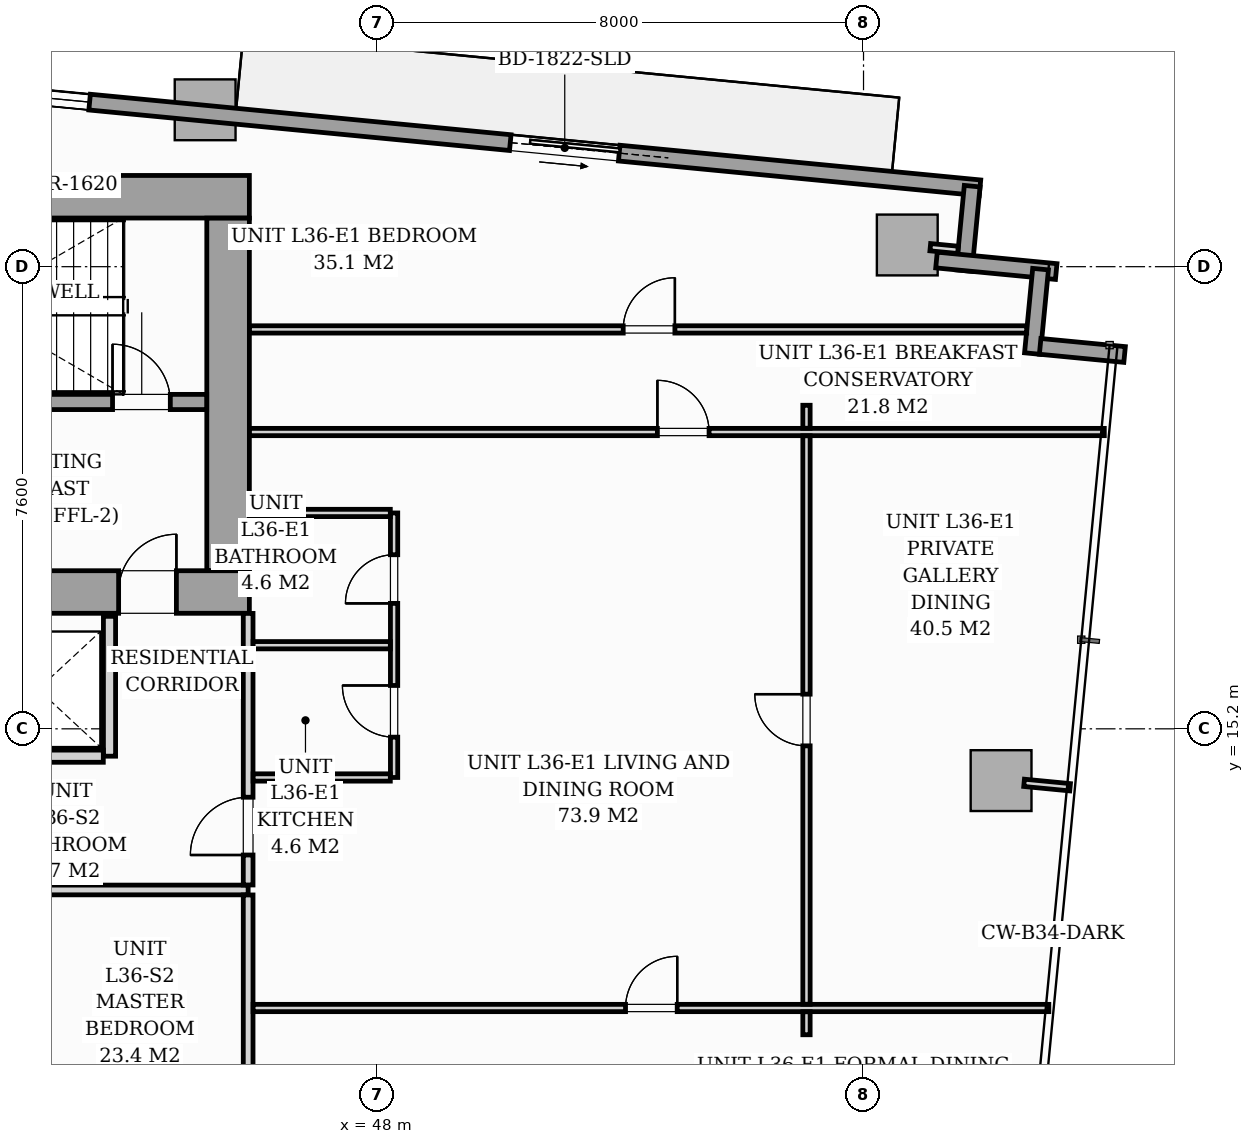
"""IFC4 building model, lengths in metres.
Left out: names, types, materials, properties, quantities, classifications, styles, units other than length and angle.
Written with IfcOpenShell. Run it as: python <this file> out.ifc"""

import sys

from ifc_helpers import new_model, si_unit, direction, frame, frame_2d, origin, origin_2d, place, context, subcontext, project, spatial, rectangle, i_section, extrude, source, transform, mapped, element, fill, save


model = new_model("IFC4")
c1 = context("Model", 3, precision=1e-05, world=origin(), true_north=direction((0.0, 1.0)))
c2 = subcontext(c1, "Body", "Model", "MODEL_VIEW")
j1 = project(units=[si_unit("LENGTHUNIT", "METRE"), si_unit("PLANEANGLEUNIT", "RADIAN")], contexts=[c1])
p1 = place(None, origin())
s1 = spatial("IfcSite", under=j1, at=p1, CompositionType="ELEMENT")
p2 = place(p1, origin())
s2 = spatial("IfcBuilding", under=s1, at=p2, CompositionType="ELEMENT")
p3 = place(p2, frame((0.0, 0.0, 127.8)))
s3 = spatial("IfcBuildingStorey", under=s2, at=p3, CompositionType="ELEMENT", Elevation=127.8)
m1 = source(origin(), c2, "Body", "SweptSolid", [
    extrude(i_section(OverallWidth=0.421, OverallDepth=0.465, WebThickness=0.045, FlangeThickness=0.073, FilletRadius=0.018, at=origin_2d()), origin(), (0.0, 0.0, 1.0), 3.196),
])
for number, where, z_axis, x_axis in (
    (1, (45.6, 17.4, 0.002), (0.0, 0.0, 1.0), (1.0, 0.0, 0.0)),
    (2, (45.6, 24.0, 0.002), (0.0, 0.0, 1.0), (1.0, 0.0, 0.0)),
):
    element("IfcColumn", number, at=place(p3, frame(where, z_axis=z_axis, x_axis=x_axis)), inside=s3, PredefinedType="PILASTER", context=c2, shape_type="MappedRepresentation", body=[
        mapped(m1, transform((0.0, 0.0, 0.0), scale=1.0)),
    ])
m2 = source(origin(), c2, "Body", "SweptSolid", [
    extrude(rectangle(XDim=1.0, YDim=1.0, at=origin_2d()), origin(), (0.0, 0.0, 1.0), 3.196),
])
for number, where, z_axis, x_axis in (
    (3, (45.173, 25.38, 0.002), (0.0, 0.0, 1.0), (0.995, -0.096, 0.0)),
    (4, (56.719, 23.157, 0.002), (0.0, 0.0, 1.0), (0.995, -0.096, 0.0)),
    (5, (58.262, 14.348, 0.002), (0.0, 0.0, 1.0), (0.995, -0.096, 0.0)),
):
    element("IfcColumn", number, at=place(p3, frame(where, z_axis=z_axis, x_axis=x_axis)), inside=s3, PredefinedType="COLUMN", context=c2, shape_type="MappedRepresentation", body=[
        mapped(m2, transform((0.0, 0.0, 0.0), scale=1.0)),
    ])
p4 = place(p3, frame((40.983, 25.727, 0.0), z_axis=(0.0, 0.0, 1.0), x_axis=(0.995395844771, -0.095849424686, 0.0)))
e6 = element("IfcWall", 6, at=p4, inside=s3, PredefinedType="STANDARD", context=c2, shape_type="SweptSolid", body=[
    extrude(rectangle(XDim=17.01, YDim=0.26, at=frame_2d((8.505, 0.0))), origin(), (0.0, 0.0, 1.0), 2.94),
])
p5 = place(p4, frame((9.25, 0.0, 0.0)))
e7 = element("IfcOpeningElement", 7, at=p5, cuts=e6, PredefinedType="OPENING", context=c2, shape_type="SweptSolid", body=[
    extrude(rectangle(XDim=1.8, YDim=2.06, at=frame_2d((0.9, 1.03))), frame((0.0, 0.14, 0.0), z_axis=(0.0, -1.0, 0.0), x_axis=(1.0, 0.0, 0.0)), (0.0, 0.0, 1.0), 0.28),
])
p6 = place(p4, frame((0.7, 0.0, 0.65)))
e8 = element("IfcOpeningElement", 8, at=p6, cuts=e6, PredefinedType="OPENING", context=c2, shape_type="SweptSolid", body=[
    extrude(rectangle(XDim=1.6, YDim=1.5, at=frame_2d((0.8, 0.75))), frame((0.0, 0.14, 0.0), z_axis=(0.0, -1.0, 0.0), x_axis=(1.0, 0.0, 0.0)), (0.0, 0.0, 1.0), 0.28),
])
p7 = place(p3, frame((57.787, 24.124, 0.0), z_axis=(0.0, 0.0, 1.0), x_axis=(-0.095915846097, -0.995389446633, 0.0)))
e9 = element("IfcWall", 9, at=p7, inside=s3, PredefinedType="STANDARD", context=c2, shape_type="SweptSolid", body=[
    extrude(rectangle(XDim=1.395, YDim=0.26, at=frame_2d((0.697, 0.0))), origin(), (0.0, 0.0, 1.0), 2.94),
])
p8 = place(p3, frame((57.2, 22.909, 0.0), z_axis=(0.0, 0.0, 1.0), x_axis=(0.995401789159, -0.095787672171, 0.0)))
e10 = element("IfcWall", 10, at=p8, inside=s3, PredefinedType="STANDARD", context=c2, shape_type="SweptSolid", body=[
    extrude(rectangle(XDim=1.978, YDim=0.26, at=frame_2d((0.989, 0.0))), origin(), (0.0, 0.0, 1.0), 2.94),
])
for number, where, z_axis, x_axis in (
    (11, (58.912, 22.76, 0.0), (0.0, 0.0, 1.0), (-0.096, -0.995, 0.0)),
    (12, (58.905, 21.49, 0.0), (0.0, 0.0, 1.0), (0.995, -0.096, 0.0)),
):
    element("IfcWall", number, at=place(p3, frame(where, z_axis=z_axis, x_axis=x_axis)), inside=s3, PredefinedType="STANDARD", context=c2, shape_type="SweptSolid", body=[
        extrude(rectangle(XDim=1.395, YDim=0.26, at=frame_2d((0.698, 0.0))), origin(), (0.0, 0.0, 1.0), 2.94),
    ])
p9 = place(p3, frame((26.1, 17.45, 0.0), z_axis=(0.0, 0.0, 1.0), x_axis=(1.0, 0.0, 0.0)))
e13 = element("IfcWall", 13, at=p9, inside=s3, PredefinedType="SHEAR", context=c2, shape_type="SweptSolid", body=[
    extrude(rectangle(XDim=19.8, YDim=0.7, at=frame_2d((9.9, 0.0))), origin(), (0.0, 0.0, 1.0), 3.2),
])
p10 = place(p9, frame((1.05, 0.0, 0.0)))
e14 = element("IfcOpeningElement", 14, at=p10, cuts=e13, PredefinedType="OPENING", context=c2, shape_type="SweptSolid", body=[
    extrude(rectangle(XDim=0.95, YDim=2.06, at=frame_2d((0.475, 1.03))), frame((0.0, 0.36, 0.0), z_axis=(0.0, -1.0, 0.0), x_axis=(1.0, 0.0, 0.0)), (0.0, 0.0, 1.0), 0.72),
])
p11 = place(p9, frame((9.48, 0.0, 0.0)))
e15 = element("IfcOpeningElement", 15, at=p11, cuts=e13, PredefinedType="OPENING", context=c2, shape_type="SweptSolid", body=[
    extrude(rectangle(XDim=0.85, YDim=2.0, at=frame_2d((0.425, 1.0))), frame((0.0, 0.36, 0.0), z_axis=(0.0, -1.0, 0.0), x_axis=(1.0, 0.0, 0.0)), (0.0, 0.0, 1.0), 0.72),
])
p12 = place(p9, frame((17.65, 0.0, 0.0)))
e16 = element("IfcOpeningElement", 16, at=p12, cuts=e13, PredefinedType="OPENING", context=c2, shape_type="SweptSolid", body=[
    extrude(rectangle(XDim=0.95, YDim=2.06, at=frame_2d((0.475, 1.03))), frame((0.0, 0.36, 0.0), z_axis=(0.0, -1.0, 0.0), x_axis=(1.0, 0.0, 0.0)), (0.0, 0.0, 1.0), 0.72),
])
p13 = place(p3, frame((26.1, 23.95, 0.0), z_axis=(0.0, 0.0, 1.0), x_axis=(1.0, 0.0, 0.0)))
e17 = element("IfcWall", 17, at=p13, inside=s3, PredefinedType="SHEAR", context=c2, shape_type="SweptSolid", body=[
    extrude(rectangle(XDim=19.8, YDim=0.7, at=frame_2d((9.9, 0.0))), origin(), (0.0, 0.0, 1.0), 3.2),
])
p14 = place(p3, frame((45.55, 17.802, 0.0), z_axis=(0.0, 0.0, 1.0), x_axis=(0.0, 1.0, 0.0)))
e18 = element("IfcWall", 18, at=p14, inside=s3, PredefinedType="SHEAR", context=c2, shape_type="SweptSolid", body=[
    extrude(rectangle(XDim=5.796, YDim=0.7, at=frame_2d((2.898, 0.0))), origin(), (0.0, 0.0, 1.0), 3.2),
])
p15 = place(p3, frame((37.05, 20.575, 0.0), z_axis=(0.0, 0.0, 1.0), x_axis=(1.0, 0.0, 0.0)))
e19 = element("IfcWall", 19, at=p15, inside=s3, PredefinedType="SOLIDWALL", context=c2, shape_type="SweptSolid", body=[
    extrude(rectangle(XDim=8.148, YDim=0.25, at=frame_2d((4.074, 0.0))), origin(), (0.0, 0.0, 1.0), 3.2),
])
p16 = place(p15, frame((6.6, 0.0, 0.0)))
e20 = element("IfcOpeningElement", 20, at=p16, cuts=e19, PredefinedType="OPENING", context=c2, shape_type="SweptSolid", body=[
    extrude(rectangle(XDim=0.95, YDim=2.06, at=frame_2d((0.475, 1.03))), frame((0.0, 0.135, 0.0), z_axis=(0.0, -1.0, 0.0), x_axis=(1.0, 0.0, 0.0)), (0.0, 0.0, 1.0), 0.27),
])
p17 = place(p3, frame((43.6, 14.75, 0.0), z_axis=(0.0, 0.0, 1.0), x_axis=(0.0, 1.0, 0.0)))
e21 = element("IfcWall", 21, at=p17, inside=s3, PredefinedType="PARTITIONING", context=c2, shape_type="SweptSolid", body=[
    extrude(rectangle(XDim=2.3, YDim=0.2, at=frame_2d((1.15, 0.0))), origin(), (0.0, 0.0, 1.0), 2.94),
])
p18 = place(p3, frame((41.352, 14.75, 0.0), z_axis=(0.0, 0.0, 1.0), x_axis=(1.0, 0.0, 0.0)))
e22 = element("IfcWall", 22, at=p18, inside=s3, PredefinedType="PARTITIONING", context=c2, shape_type="SweptSolid", body=[
    extrude(rectangle(XDim=2.146, YDim=0.2, at=frame_2d((1.073, 0.0))), origin(), (0.0, 0.0, 1.0), 2.94),
])
p19 = place(p3, frame((22.05, 12.55, 0.0), z_axis=(0.0, 0.0, 1.0), x_axis=(1.0, 0.0, 0.0)))
e23 = element("IfcWall", 23, at=p19, inside=s3, PredefinedType="PARTITIONING", context=c2, shape_type="SweptSolid", body=[
    extrude(rectangle(XDim=23.83, YDim=0.16, at=frame_2d((11.915, 0.0))), origin(), (0.0, 0.0, 1.0), 2.94),
])
p20 = place(p19, frame((0.655, 0.0, 0.0)))
e24 = element("IfcOpeningElement", 24, at=p20, cuts=e23, PredefinedType="OPENING", context=c2, shape_type="SweptSolid", body=[
    extrude(rectangle(XDim=0.95, YDim=2.06, at=frame_2d((0.475, 1.03))), frame((0.0, 0.09, 0.0), z_axis=(0.0, -1.0, 0.0), x_axis=(1.0, 0.0, 0.0)), (0.0, 0.0, 1.0), 0.18),
])
p21 = place(p19, frame((12.04, 0.0, 0.0)))
e25 = element("IfcOpeningElement", 25, at=p21, cuts=e23, PredefinedType="OPENING", context=c2, shape_type="SweptSolid", body=[
    extrude(rectangle(XDim=0.95, YDim=2.06, at=frame_2d((0.475, 1.03))), frame((0.0, 0.09, 0.0), z_axis=(0.0, -1.0, 0.0), x_axis=(1.0, 0.0, 0.0)), (0.0, 0.0, 1.0), 0.18),
])
p22 = place(p3, frame((45.88, 5.958, 0.0), z_axis=(0.0, 0.0, 1.0), x_axis=(0.0, 1.0, 0.0)))
e26 = element("IfcWall", 26, at=p22, inside=s3, PredefinedType="PARTITIONING", context=c2, shape_type="SweptSolid", body=[
    extrude(rectangle(XDim=6.51, YDim=0.16, at=frame_2d((3.255, 0.0))), origin(), (0.0, 0.0, 1.0), 2.94),
])
p23 = place(p3, frame((45.88, 12.632, 0.0), z_axis=(0.0, 0.0, 1.0), x_axis=(0.0, 1.0, 0.0)))
e27 = element("IfcWall", 27, at=p23, inside=s3, PredefinedType="PARTITIONING", context=c2, shape_type="SweptSolid", body=[
    extrude(rectangle(XDim=4.466, YDim=0.16, at=frame_2d((2.233, 0.0))), origin(), (0.0, 0.0, 1.0), 2.94),
])
p24 = place(p23, frame((0.493, 0.0, 0.0)))
e28 = element("IfcOpeningElement", 28, at=p24, cuts=e27, PredefinedType="OPENING", context=c2, shape_type="SweptSolid", body=[
    extrude(rectangle(XDim=0.95, YDim=2.06, at=frame_2d((0.475, 1.03))), frame((0.0, 0.09, 0.0), z_axis=(0.0, -1.0, 0.0), x_axis=(1.0, 0.0, 0.0)), (0.0, 0.0, 1.0), 0.18),
])
p25 = place(p3, frame((48.28, 14.4, 0.0), z_axis=(0.0, 0.0, 1.0), x_axis=(0.0, 1.0, 0.0)))
e29 = element("IfcWall", 29, at=p25, inside=s3, PredefinedType="PARTITIONING", context=c2, shape_type="SweptSolid", body=[
    extrude(rectangle(XDim=4.35, YDim=0.12, at=frame_2d((2.175, 0.0))), origin(), (0.0, 0.0, 1.0), 2.94),
])
p26 = place(p25, frame((0.663, 0.0, 0.0)))
e30 = element("IfcOpeningElement", 30, at=p26, cuts=e29, PredefinedType="OPENING", context=c2, shape_type="SweptSolid", body=[
    extrude(rectangle(XDim=0.85, YDim=2.05, at=frame_2d((0.425, 1.025))), frame((0.0, 0.07, 0.0), z_axis=(0.0, -1.0, 0.0), x_axis=(1.0, 0.0, 0.0)), (0.0, 0.0, 1.0), 0.14),
])
p27 = place(p25, frame((2.863, 0.0, 0.0)))
e31 = element("IfcOpeningElement", 31, at=p27, cuts=e29, PredefinedType="OPENING", context=c2, shape_type="SweptSolid", body=[
    extrude(rectangle(XDim=0.8, YDim=2.02, at=frame_2d((0.4, 1.01))), frame((0.0, 0.07, 0.0), z_axis=(0.0, -1.0, 0.0), x_axis=(1.0, 0.0, 0.0)), (0.0, 0.0, 1.0), 0.14),
])
for number, where, z_axis, x_axis in (
    (32, (45.962, 16.575, 0.0), (0.0, 0.0, 1.0), (1.0, 0.0, 0.0)),
    (33, (45.962, 14.4, 0.0), (0.0, 0.0, 1.0), (1.0, 0.0, 0.0)),
):
    element("IfcWall", number, at=place(p3, frame(where, z_axis=z_axis, x_axis=x_axis)), inside=s3, PredefinedType="PARTITIONING", context=c2, shape_type="SweptSolid", body=[
        extrude(rectangle(XDim=2.256, YDim=0.12, at=frame_2d((1.128, 0.0))), origin(), (0.0, 0.0, 1.0), 2.94),
    ])
p28 = place(p3, frame((45.902, 18.75, 0.0), z_axis=(0.0, 0.0, 1.0), x_axis=(1.0, 0.0, 0.0)))
e34 = element("IfcWall", 34, at=p28, inside=s3, PredefinedType="PARTITIONING", context=c2, shape_type="SweptSolid", body=[
    extrude(rectangle(XDim=2.316, YDim=0.12, at=frame_2d((1.158, 0.0))), origin(), (0.0, 0.0, 1.0), 2.94),
])
p29 = place(p3, frame((45.902, 21.768, 0.0), z_axis=(0.0, 0.0, 1.0), x_axis=(1.0, 0.0, 0.0)))
e35 = element("IfcWall", 35, at=p29, inside=s3, PredefinedType="PARTITIONING", context=c2, shape_type="SweptSolid", body=[
    extrude(rectangle(XDim=12.781, YDim=0.12, at=frame_2d((6.391, 0.0))), origin(), (0.0, 0.0, 1.0), 2.94),
])
p30 = place(p29, frame((6.146, 0.0, 0.0)))
e36 = element("IfcOpeningElement", 36, at=p30, cuts=e35, PredefinedType="OPENING", context=c2, shape_type="SweptSolid", body=[
    extrude(rectangle(XDim=0.85, YDim=2.05, at=frame_2d((0.425, 1.025))), frame((0.0, 0.07, 0.0), z_axis=(0.0, -1.0, 0.0), x_axis=(1.0, 0.0, 0.0)), (0.0, 0.0, 1.0), 0.14),
])
p31 = place(p3, frame((45.962, 10.609, 0.0), z_axis=(0.0, 0.0, 1.0), x_axis=(1.0, 0.0, 0.0)))
e37 = element("IfcWall", 37, at=p31, inside=s3, PredefinedType="PARTITIONING", context=c2, shape_type="SweptSolid", body=[
    extrude(rectangle(XDim=13.085, YDim=0.12, at=frame_2d((6.543, 0.0))), origin(), (0.0, 0.0, 1.0), 2.94),
])
p32 = place(p31, frame((6.124, 0.0, 0.0)))
e38 = element("IfcOpeningElement", 38, at=p32, cuts=e37, PredefinedType="OPENING", context=c2, shape_type="SweptSolid", body=[
    extrude(rectangle(XDim=0.85, YDim=2.05, at=frame_2d((0.425, 1.025))), frame((0.0, 0.07, 0.0), z_axis=(0.0, -1.0, 0.0), x_axis=(1.0, 0.0, 0.0)), (0.0, 0.0, 1.0), 0.14),
])
p33 = place(p3, frame((45.902, 20.081, 0.0), z_axis=(0.0, 0.0, 1.0), x_axis=(1.0, 0.0, 0.0)))
e39 = element("IfcWall", 39, at=p33, inside=s3, PredefinedType="PARTITIONING", context=c2, shape_type="SweptSolid", body=[
    extrude(rectangle(XDim=14.057, YDim=0.12, at=frame_2d((7.029, 0.0))), origin(), (0.0, 0.0, 1.0), 2.94),
])
p34 = place(p33, frame((6.708, 0.0, 0.0)))
e40 = element("IfcOpeningElement", 40, at=p34, cuts=e39, PredefinedType="OPENING", context=c2, shape_type="SweptSolid", body=[
    extrude(rectangle(XDim=0.85, YDim=2.05, at=frame_2d((0.425, 1.025))), frame((0.0, 0.07, 0.0), z_axis=(0.0, -1.0, 0.0), x_axis=(1.0, 0.0, 0.0)), (0.0, 0.0, 1.0), 0.14),
])
p35 = place(p3, frame((55.062, 10.169, 0.0), z_axis=(0.0, 0.0, 1.0), x_axis=(0.0, 1.0, 0.0)))
e41 = element("IfcWall", 41, at=p35, inside=s3, PredefinedType="PARTITIONING", context=c2, shape_type="SweptSolid", body=[
    extrude(rectangle(XDim=0.378, YDim=0.12, at=frame_2d((0.189, 0.0))), origin(), (0.0, 0.0, 1.0), 2.94),
])
p36 = place(p3, frame((55.062, 10.671, 0.0), z_axis=(0.0, 0.0, 1.0), x_axis=(0.0, 1.0, 0.0)))
e42 = element("IfcWall", 42, at=p36, inside=s3, PredefinedType="PARTITIONING", context=c2, shape_type="SweptSolid", body=[
    extrude(rectangle(XDim=9.348, YDim=0.12, at=frame_2d((4.674, 0.0))), origin(), (0.0, 0.0, 1.0), 2.94),
])
p37 = place(p36, frame((4.249, 0.0, 0.0)))
e43 = element("IfcOpeningElement", 43, at=p37, cuts=e42, PredefinedType="OPENING", context=c2, shape_type="SweptSolid", body=[
    extrude(rectangle(XDim=0.85, YDim=2.05, at=frame_2d((0.425, 1.025))), frame((0.0, 0.07, 0.0), z_axis=(0.0, -1.0, 0.0), x_axis=(1.0, 0.0, 0.0)), (0.0, 0.0, 1.0), 0.14),
])
p38 = place(p3, frame((55.062, 20.143, 0.0), z_axis=(0.0, 0.0, 1.0), x_axis=(0.0, 1.0, 0.0)))
e44 = element("IfcWall", 44, at=p38, inside=s3, PredefinedType="PARTITIONING", context=c2, shape_type="SweptSolid", body=[
    extrude(rectangle(XDim=0.378, YDim=0.12, at=frame_2d((0.189, 0.0))), origin(), (0.0, 0.0, 1.0), 2.94),
])
p39 = place(p3, frame((57.098, 23.12, 0.0), z_axis=(0.0, 0.0, 1.0), x_axis=(0.995384576284, -0.09596637586, 0.0)))
e45 = element("IfcWall", 45, at=p39, inside=s3, PredefinedType="PARTITIONING", context=c2, shape_type="SweptSolid", body=[
    extrude(rectangle(XDim=0.458, YDim=0.12, at=frame_2d((0.229, 0.0))), origin(), (0.0, 0.0, 1.0), 2.94),
])
p40 = place(p3, frame((58.64, 14.312, 0.0), z_axis=(0.0, 0.0, 1.0), x_axis=(0.995377786728, -0.096036772582, 0.0)))
e46 = element("IfcWall", 46, at=p40, inside=s3, PredefinedType="PARTITIONING", context=c2, shape_type="SweptSolid", body=[
    extrude(rectangle(XDim=0.76, YDim=0.12, at=frame_2d((0.38, 0.0))), origin(), (0.0, 0.0, 1.0), 2.94),
])
m3 = source(origin(), c2, "Body", "SweptSolid", [
    extrude(rectangle(XDim=1.8, YDim=2.06, at=frame_2d((0.9, 1.03))), frame((0.0, 0.025, 0.0), z_axis=(0.0, -1.0, 0.0), x_axis=(1.0, 0.0, 0.0)), (0.0, 0.0, 1.0), 0.05),
])
p41 = place(p5, origin())
e47 = element("IfcDoor", 47, at=p41, inside=s3, OperationType="SLIDING_TO_RIGHT", PredefinedType="DOOR", context=c2, shape_type="MappedRepresentation", body=[
    mapped(m3, transform((0.0, 0.0, 0.0), scale=1.0)),
])
fill(e7, e47)
m4 = source(origin(), c2, "Body", "SweptSolid", [
    extrude(rectangle(XDim=1.6, YDim=1.5, at=frame_2d((0.8, 0.75))), frame((0.0, 0.03, 0.0), z_axis=(0.0, -1.0, 0.0), x_axis=(1.0, 0.0, 0.0)), (0.0, 0.0, 1.0), 0.06),
])
p42 = place(p6, origin())
e48 = element("IfcWindow", 48, at=p42, inside=s3, PartitioningType="SINGLE_PANEL", PredefinedType="WINDOW", context=c2, shape_type="MappedRepresentation", body=[
    mapped(m4, transform((0.0, 0.0, 0.0), scale=1.0)),
])
fill(e8, e48)
m5 = source(origin(), c2, "Body", "SweptSolid", [
    extrude(rectangle(XDim=0.95, YDim=2.06, at=frame_2d((0.475, 1.03))), frame((0.0, 0.025, 0.0), z_axis=(0.0, -1.0, 0.0), x_axis=(1.0, 0.0, 0.0)), (0.0, 0.0, 1.0), 0.05),
])
p43 = place(p12, origin())
e49 = element("IfcDoor", 49, at=p43, inside=s3, OperationType="SINGLE_SWING_RIGHT", PredefinedType="DOOR", context=c2, shape_type="MappedRepresentation", body=[
    mapped(m5, transform((0.0, 0.0, 0.0), scale=1.0)),
])
fill(e16, e49)
p44 = place(p16, origin())
e50 = element("IfcDoor", 50, at=p44, inside=s3, OperationType="SINGLE_SWING_LEFT", PredefinedType="DOOR", context=c2, shape_type="MappedRepresentation", body=[
    mapped(m5, transform((0.0, 0.0, 0.0), scale=1.0)),
])
fill(e20, e50)
m6 = source(origin(), c2, "Body", "SweptSolid", [
    extrude(rectangle(XDim=0.95, YDim=2.06, at=frame_2d((0.475, 1.03))), frame((0.0, 0.025, 0.0), z_axis=(0.0, -1.0, 0.0), x_axis=(1.0, 0.0, 0.0)), (0.0, 0.0, 1.0), 0.05),
])
p45 = place(p24, origin())
e51 = element("IfcDoor", 51, at=p45, inside=s3, OperationType="SINGLE_SWING_LEFT", PredefinedType="DOOR", context=c2, shape_type="MappedRepresentation", body=[
    mapped(m6, transform((0.0, 0.0, 0.0), scale=1.0)),
])
fill(e28, e51)
m7 = source(origin(), c2, "Body", "SweptSolid", [
    extrude(rectangle(XDim=0.85, YDim=2.05, at=frame_2d((0.425, 1.025))), frame((0.0, 0.025, 0.0), z_axis=(0.0, -1.0, 0.0), x_axis=(1.0, 0.0, 0.0)), (0.0, 0.0, 1.0), 0.05),
])
p46 = place(p26, origin())
e52 = element("IfcDoor", 52, at=p46, inside=s3, OperationType="SINGLE_SWING_RIGHT", PredefinedType="DOOR", context=c2, shape_type="MappedRepresentation", body=[
    mapped(m7, transform((0.0, 0.0, 0.0), scale=1.0)),
])
fill(e30, e52)
m8 = source(origin(), c2, "Body", "SweptSolid", [
    extrude(rectangle(XDim=0.8, YDim=2.02, at=frame_2d((0.4, 1.01))), frame((0.0, 0.025, 0.0), z_axis=(0.0, -1.0, 0.0), x_axis=(1.0, 0.0, 0.0)), (0.0, 0.0, 1.0), 0.05),
])
p47 = place(p27, origin())
e53 = element("IfcDoor", 53, at=p47, inside=s3, OperationType="SINGLE_SWING_LEFT", PredefinedType="DOOR", context=c2, shape_type="MappedRepresentation", body=[
    mapped(m8, transform((0.0, 0.0, 0.0), scale=1.0)),
])
fill(e31, e53)
p48 = place(p30, origin())
e54 = element("IfcDoor", 54, at=p48, inside=s3, OperationType="SINGLE_SWING_RIGHT", PredefinedType="DOOR", context=c2, shape_type="MappedRepresentation", body=[
    mapped(m7, transform((0.0, 0.0, 0.0), scale=1.0)),
])
fill(e36, e54)
p49 = place(p32, origin())
e55 = element("IfcDoor", 55, at=p49, inside=s3, OperationType="SINGLE_SWING_RIGHT", PredefinedType="DOOR", context=c2, shape_type="MappedRepresentation", body=[
    mapped(m7, transform((0.0, 0.0, 0.0), scale=1.0)),
])
fill(e38, e55)
p50 = place(p34, origin())
e56 = element("IfcDoor", 56, at=p50, inside=s3, OperationType="SINGLE_SWING_LEFT", PredefinedType="DOOR", context=c2, shape_type="MappedRepresentation", body=[
    mapped(m7, transform((0.0, 0.0, 0.0), scale=1.0)),
])
fill(e40, e56)
p51 = place(p37, origin())
e57 = element("IfcDoor", 57, at=p51, inside=s3, OperationType="SINGLE_SWING_RIGHT", PredefinedType="DOOR", context=c2, shape_type="MappedRepresentation", body=[
    mapped(m7, transform((0.0, 0.0, 0.0), scale=1.0)),
])
fill(e43, e57)
save(model, sys.argv[1])
